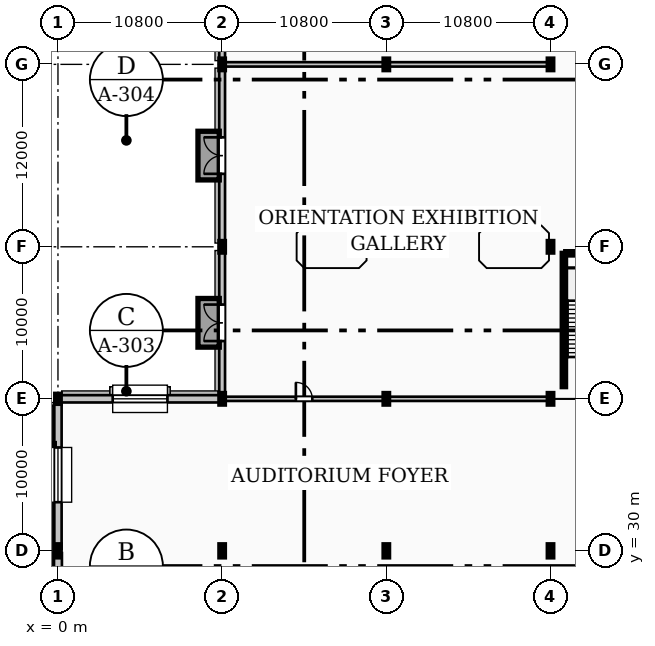
"""IFC4 building model, lengths in metres.
Left out: names, types, materials, properties, quantities, classifications, styles, units other than length and angle.
Written with IfcOpenShell. Run it as: python <this file> out.ifc"""

import sys

from ifc_helpers import new_model, si_unit, direction, frame, frame_2d, origin, origin_2d, place, context, subcontext, project, spatial, rectangle, i_section, extrude, element, fill, save


model = new_model("IFC4")
c1 = context("Model", 3, precision=1e-05, world=origin(), true_north=direction((0.0, 1.0)))
c2 = subcontext(c1, "Body", "Model", "MODEL_VIEW")
j1 = project(units=[si_unit("LENGTHUNIT", "METRE"), si_unit("PLANEANGLEUNIT", "RADIAN")], contexts=[c1])
p1 = place(None, origin())
s1 = spatial("IfcSite", under=j1, at=p1, CompositionType="ELEMENT")
p2 = place(p1, origin())
s2 = spatial("IfcBuilding", under=s1, at=p2, CompositionType="ELEMENT")
p3 = place(p2, origin())
s3 = spatial("IfcBuildingStorey", under=s2, at=p3, CompositionType="ELEMENT", Elevation=0.0)
p4 = place(p3, frame((0.0, 30.0, 0.0), z_axis=(0.0, 0.0, 1.0), x_axis=(1.0, 0.0, 0.0)))
e1 = element("IfcColumn", 1, at=p4, inside=s3, PredefinedType="COLUMN", context=c2, shape_type="SweptSolid", body=[
    extrude(i_section(OverallWidth=0.3, OverallDepth=0.8, WebThickness=0.018, FlangeThickness=0.033, FilletRadius=0.03, at=origin_2d()), origin(), (0.0, 0.0, 1.0), 4.8),
])
p5 = place(p3, frame((0.0, 40.0, 0.0), z_axis=(0.0, 0.0, 1.0), x_axis=(1.0, 0.0, 0.0)))
e2 = element("IfcColumn", 2, at=p5, inside=s3, PredefinedType="COLUMN", context=c2, shape_type="SweptSolid", body=[
    extrude(i_section(OverallWidth=0.3, OverallDepth=0.6, WebThickness=0.015, FlangeThickness=0.03, FilletRadius=0.027, at=origin_2d()), origin(), (0.0, 0.0, 1.0), 4.8),
])
p6 = place(p3, frame((10.8, 30.0, 0.0), z_axis=(0.0, 0.0, 1.0), x_axis=(1.0, 0.0, 0.0)))
e3 = element("IfcColumn", 3, at=p6, inside=s3, PredefinedType="COLUMN", context=c2, shape_type="SweptSolid", body=[
    extrude(i_section(OverallWidth=0.3, OverallDepth=0.8, WebThickness=0.018, FlangeThickness=0.033, FilletRadius=0.03, at=origin_2d()), origin(), (0.0, 0.0, 1.0), 4.8),
])
for number, where, z_axis, x_axis in (
    (4, (10.8, 40.0, 0.0), (0.0, 0.0, 1.0), (1.0, 0.0, 0.0)),
    (5, (10.8, 50.0, 0.0), (0.0, 0.0, 1.0), (1.0, 0.0, 0.0)),
    (6, (10.8, 62.0, 0.0), (0.0, 0.0, 1.0), (1.0, 0.0, 0.0)),
):
    element("IfcColumn", number, at=place(p3, frame(where, z_axis=z_axis, x_axis=x_axis)), inside=s3, PredefinedType="COLUMN", context=c2, shape_type="SweptSolid", body=[
        extrude(i_section(OverallWidth=0.3, OverallDepth=0.7, WebThickness=0.017, FlangeThickness=0.032, FilletRadius=0.027, at=origin_2d()), origin(), (0.0, 0.0, 1.0), 4.8),
    ])
p7 = place(p3, frame((21.6, 30.0, 0.0), z_axis=(0.0, 0.0, 1.0), x_axis=(1.0, 0.0, 0.0)))
e7 = element("IfcColumn", 7, at=p7, inside=s3, PredefinedType="COLUMN", context=c2, shape_type="SweptSolid", body=[
    extrude(i_section(OverallWidth=0.3, OverallDepth=0.8, WebThickness=0.018, FlangeThickness=0.033, FilletRadius=0.03, at=origin_2d()), origin(), (0.0, 0.0, 1.0), 4.8),
])
for number, where, z_axis, x_axis in (
    (8, (21.6, 40.0, 0.0), (0.0, 0.0, 1.0), (1.0, 0.0, 0.0)),
    (9, (21.6, 50.0, 0.0), (0.0, 0.0, 1.0), (1.0, 0.0, 0.0)),
    (10, (21.6, 62.0, 0.0), (0.0, 0.0, 1.0), (1.0, 0.0, 0.0)),
):
    element("IfcColumn", number, at=place(p3, frame(where, z_axis=z_axis, x_axis=x_axis)), inside=s3, PredefinedType="COLUMN", context=c2, shape_type="SweptSolid", body=[
        extrude(i_section(OverallWidth=0.3, OverallDepth=0.7, WebThickness=0.017, FlangeThickness=0.032, FilletRadius=0.027, at=origin_2d()), origin(), (0.0, 0.0, 1.0), 4.8),
    ])
p8 = place(p3, frame((32.4, 30.0, 0.0), z_axis=(0.0, 0.0, 1.0), x_axis=(1.0, 0.0, 0.0)))
e11 = element("IfcColumn", 11, at=p8, inside=s3, PredefinedType="COLUMN", context=c2, shape_type="SweptSolid", body=[
    extrude(i_section(OverallWidth=0.3, OverallDepth=0.8, WebThickness=0.018, FlangeThickness=0.033, FilletRadius=0.03, at=origin_2d()), origin(), (0.0, 0.0, 1.0), 4.8),
])
for number, where, z_axis, x_axis in (
    (12, (32.4, 40.0, 0.0), (0.0, 0.0, 1.0), (1.0, 0.0, 0.0)),
    (13, (32.4, 50.0, 0.0), (0.0, 0.0, 1.0), (1.0, 0.0, 0.0)),
    (14, (32.4, 62.0, 0.0), (0.0, 0.0, 1.0), (1.0, 0.0, 0.0)),
):
    element("IfcColumn", number, at=place(p3, frame(where, z_axis=z_axis, x_axis=x_axis)), inside=s3, PredefinedType="COLUMN", context=c2, shape_type="SweptSolid", body=[
        extrude(i_section(OverallWidth=0.3, OverallDepth=0.7, WebThickness=0.017, FlangeThickness=0.032, FilletRadius=0.027, at=origin_2d()), origin(), (0.0, 0.0, 1.0), 4.8),
    ])
p9 = place(p3, frame((-0.43, 0.45, -1.38), z_axis=(0.0, 0.0, 1.0), x_axis=(0.0, 1.0, 0.0)))
e15 = element("IfcWall", 15, at=p9, inside=s3, PredefinedType="PARAPET", context=c2, shape_type="SweptSolid", body=[
    extrude(rectangle(XDim=39.1, YDim=0.26, at=frame_2d((19.55, 0.0))), origin(), (0.0, 0.0, 1.0), 1.36),
])
p10 = place(p3, frame((0.0, 39.855, 0.0), z_axis=(0.0, 0.0, 1.0), x_axis=(0.0, -1.0, 0.0)))
e16 = element("IfcWall", 16, at=p10, inside=s3, PredefinedType="STANDARD", context=c2, shape_type="SweptSolid", body=[
    extrude(rectangle(XDim=9.71, YDim=0.48, at=frame_2d((4.855, 0.0))), origin(), (0.0, 0.0, 1.0), 4.56),
])
p11 = place(p10, frame((3.055, 0.0, 0.9)))
e17 = element("IfcOpeningElement", 17, at=p11, cuts=e16, PredefinedType="OPENING", context=c2, shape_type="SweptSolid", body=[
    extrude(rectangle(XDim=3.6, YDim=2.8, at=frame_2d((1.8, 1.4))), frame((0.0, 0.25, 0.0), z_axis=(0.0, -1.0, 0.0), x_axis=(1.0, 0.0, 0.0)), (0.0, 0.0, 1.0), 0.5),
])
p12 = place(p3, frame((0.0, 29.855, 0.0), z_axis=(0.0, 0.0, 1.0), x_axis=(0.0, -1.0, 0.0)))
e18 = element("IfcWall", 18, at=p12, inside=s3, PredefinedType="SOLIDWALL", context=c2, shape_type="SweptSolid", body=[
    extrude(rectangle(XDim=9.71, YDim=0.52, at=frame_2d((4.855, 0.0))), origin(), (0.0, 0.0, 1.0), 4.56),
])
p13 = place(p3, frame((10.8, 71.855, 0.0), z_axis=(0.0, 0.0, 1.0), x_axis=(0.0, -1.0, 0.0)))
e19 = element("IfcWall", 19, at=p13, inside=s3, PredefinedType="STANDARD", context=c2, shape_type="SweptSolid", body=[
    extrude(rectangle(XDim=9.71, YDim=0.38, at=frame_2d((4.855, 0.0))), origin(), (0.0, 0.0, 1.0), 4.04),
])
p14 = place(p13, frame((3.655, 0.0, 0.0)))
e20 = element("IfcOpeningElement", 20, at=p14, cuts=e19, PredefinedType="OPENING", context=c2, shape_type="SweptSolid", body=[
    extrude(rectangle(XDim=2.4, YDim=2.6, at=frame_2d((1.2, 1.3))), frame((0.0, 0.2, 0.0), z_axis=(0.0, -1.0, 0.0), x_axis=(1.0, 0.0, 0.0)), (0.0, 0.0, 1.0), 0.4),
])
p15 = place(p3, frame((10.8, 61.855, 0.0), z_axis=(0.0, 0.0, 1.0), x_axis=(0.0, -1.0, 0.0)))
e21 = element("IfcWall", 21, at=p15, inside=s3, PredefinedType="STANDARD", context=c2, shape_type="SweptSolid", body=[
    extrude(rectangle(XDim=11.71, YDim=0.38, at=frame_2d((5.855, 0.0))), origin(), (0.0, 0.0, 1.0), 3.939),
])
p16 = place(p15, frame((4.655, 0.0, 0.0)))
e22 = element("IfcOpeningElement", 22, at=p16, cuts=e21, PredefinedType="OPENING", context=c2, shape_type="SweptSolid", body=[
    extrude(rectangle(XDim=2.4, YDim=2.6, at=frame_2d((1.2, 1.3))), frame((0.0, 0.2, 0.0), z_axis=(0.0, -1.0, 0.0), x_axis=(1.0, 0.0, 0.0)), (0.0, 0.0, 1.0), 0.4),
])
p17 = place(p3, frame((10.8, 49.855, 0.0), z_axis=(0.0, 0.0, 1.0), x_axis=(0.0, -1.0, 0.0)))
e23 = element("IfcWall", 23, at=p17, inside=s3, PredefinedType="STANDARD", context=c2, shape_type="SweptSolid", body=[
    extrude(rectangle(XDim=9.71, YDim=0.38, at=frame_2d((4.855, 0.0))), origin(), (0.0, 0.0, 1.0), 4.04),
])
p18 = place(p17, frame((3.655, 0.0, 0.0)))
e24 = element("IfcOpeningElement", 24, at=p18, cuts=e23, PredefinedType="OPENING", context=c2, shape_type="SweptSolid", body=[
    extrude(rectangle(XDim=2.4, YDim=2.6, at=frame_2d((1.2, 1.3))), frame((0.0, 0.2, 0.0), z_axis=(0.0, -1.0, 0.0), x_axis=(1.0, 0.0, 0.0)), (0.0, 0.0, 1.0), 0.4),
])
p19 = place(p3, frame((10.655, 40.0, 0.0), z_axis=(0.0, 0.0, 1.0), x_axis=(-1.0, 0.0, 0.0)))
e25 = element("IfcWall", 25, at=p19, inside=s3, PredefinedType="STANDARD", context=c2, shape_type="SweptSolid", body=[
    extrude(rectangle(XDim=10.51, YDim=0.48, at=frame_2d((5.255, 0.0))), origin(), (0.0, 0.0, 1.0), 4.009),
])
p20 = place(p19, frame((3.455, 0.0, 0.9)))
e26 = element("IfcOpeningElement", 26, at=p20, cuts=e25, PredefinedType="OPENING", context=c2, shape_type="SweptSolid", body=[
    extrude(rectangle(XDim=3.6, YDim=2.8, at=frame_2d((1.8, 1.4))), frame((0.0, 0.25, 0.0), z_axis=(0.0, -1.0, 0.0), x_axis=(1.0, 0.0, 0.0)), (0.0, 0.0, 1.0), 0.5),
])
p21 = place(p3, frame((33.28, 40.8, 0.0), z_axis=(0.0, 0.0, 1.0), x_axis=(0.0, 1.0, 0.0)))
e27 = element("IfcWall", 27, at=p21, inside=s3, PredefinedType="SHEAR", context=c2, shape_type="SweptSolid", body=[
    extrude(rectangle(XDim=8.77, YDim=0.22, at=frame_2d((4.385, 0.0))), origin(), (0.0, 0.0, 1.0), 4.56),
])
p22 = place(p3, frame((33.4, 49.57, 0.0), z_axis=(0.0, 0.0, 1.0), x_axis=(1.0, 0.0, 0.0)))
e28 = element("IfcWall", 28, at=p22, inside=s3, PredefinedType="SHEAR", context=c2, shape_type="SweptSolid", body=[
    extrude(rectangle(XDim=4.4, YDim=0.22, at=frame_2d((2.2, 0.0))), origin(), (0.0, 0.0, 1.0), 4.56),
])
p23 = place(p3, frame((10.98, 40.0, 0.0), z_axis=(0.0, 0.0, 1.0), x_axis=(1.0, 0.0, 0.0)))
e29 = element("IfcWall", 29, at=p23, inside=s3, PredefinedType="SOLIDWALL", context=c2, shape_type="SweptSolid", body=[
    extrude(rectangle(XDim=10.42, YDim=0.28, at=frame_2d((5.21, 0.0))), origin(), (0.0, 0.0, 1.0), 3.989),
])
p24 = place(p23, frame((4.67, 0.0, 0.0)))
e30 = element("IfcOpeningElement", 30, at=p24, cuts=e29, PredefinedType="OPENING", context=c2, shape_type="SweptSolid", body=[
    extrude(rectangle(XDim=1.08, YDim=2.25, at=frame_2d((0.54, 1.125))), frame((0.0, 0.15, 0.0), z_axis=(0.0, -1.0, 0.0), x_axis=(1.0, 0.0, 0.0)), (0.0, 0.0, 1.0), 0.3),
])
p25 = place(p3, frame((21.8, 40.0, 0.0), z_axis=(0.0, 0.0, 1.0), x_axis=(1.0, 0.0, 0.0)))
e31 = element("IfcWall", 31, at=p25, inside=s3, PredefinedType="SOLIDWALL", context=c2, shape_type="SweptSolid", body=[
    extrude(rectangle(XDim=10.4, YDim=0.28, at=frame_2d((5.2, 0.0))), origin(), (0.0, 0.0, 1.0), 3.989),
])
p26 = place(p3, frame((10.98, 62.0, 0.0), z_axis=(0.0, 0.0, 1.0), x_axis=(1.0, 0.0, 0.0)))
e32 = element("IfcWall", 32, at=p26, inside=s3, PredefinedType="PARTITIONING", context=c2, shape_type="SweptSolid", body=[
    extrude(rectangle(XDim=10.42, YDim=0.29, at=frame_2d((5.21, 0.0))), origin(), (0.0, 0.0, 1.0), 4.049),
])
p27 = place(p3, frame((21.8, 62.0, 0.0), z_axis=(0.0, 0.0, 1.0), x_axis=(1.0, 0.0, 0.0)))
e33 = element("IfcWall", 33, at=p27, inside=s3, PredefinedType="PARTITIONING", context=c2, shape_type="SweptSolid", body=[
    extrude(rectangle(XDim=10.4, YDim=0.29, at=frame_2d((5.2, 0.0))), origin(), (0.0, 0.0, 1.0), 4.049),
])
p28 = place(p11, origin())
e34 = element("IfcWindow", 34, at=p28, inside=s3, PartitioningType="SINGLE_PANEL", PredefinedType="WINDOW", context=c2, shape_type="SweptSolid", body=[
    extrude(rectangle(XDim=3.6, YDim=2.8, at=frame_2d((1.8, 1.4))), frame((0.0, 0.03, 0.0), z_axis=(0.0, -1.0, 0.0), x_axis=(1.0, 0.0, 0.0)), (0.0, 0.0, 1.0), 0.06),
])
fill(e17, e34)
p29 = place(p16, frame((2.4, 0.0, 0.0), z_axis=(0.0, 0.0, 1.0), x_axis=(-1.0, 0.0, 0.0)))
e35 = element("IfcDoor", 35, at=p29, inside=s3, OperationType="DOUBLE_DOOR_SINGLE_SWING", PredefinedType="DOOR", context=c2, shape_type="SweptSolid", body=[
    extrude(rectangle(XDim=2.4, YDim=2.6, at=frame_2d((1.2, 1.3))), frame((0.0, 0.025, 0.0), z_axis=(0.0, -1.0, 0.0), x_axis=(1.0, 0.0, 0.0)), (0.0, 0.0, 1.0), 0.05),
])
fill(e22, e35)
p30 = place(p18, frame((2.4, 0.0, 0.0), z_axis=(0.0, 0.0, 1.0), x_axis=(-1.0, 0.0, 0.0)))
e36 = element("IfcDoor", 36, at=p30, inside=s3, OperationType="DOUBLE_DOOR_SINGLE_SWING", PredefinedType="DOOR", context=c2, shape_type="SweptSolid", body=[
    extrude(rectangle(XDim=2.4, YDim=2.6, at=frame_2d((1.2, 1.3))), frame((0.0, 0.025, 0.0), z_axis=(0.0, -1.0, 0.0), x_axis=(1.0, 0.0, 0.0)), (0.0, 0.0, 1.0), 0.05),
])
fill(e24, e36)
p31 = place(p20, origin())
e37 = element("IfcWindow", 37, at=p31, inside=s3, PartitioningType="SINGLE_PANEL", PredefinedType="WINDOW", context=c2, shape_type="SweptSolid", body=[
    extrude(rectangle(XDim=3.6, YDim=2.8, at=frame_2d((1.8, 1.4))), frame((0.0, 0.03, 0.0), z_axis=(0.0, -1.0, 0.0), x_axis=(1.0, 0.0, 0.0)), (0.0, 0.0, 1.0), 0.06),
])
fill(e26, e37)
p32 = place(p24, origin())
e38 = element("IfcDoor", 38, at=p32, inside=s3, OperationType="SINGLE_SWING_LEFT", PredefinedType="DOOR", context=c2, shape_type="SweptSolid", body=[
    extrude(rectangle(XDim=1.08, YDim=2.25, at=frame_2d((0.54, 1.125))), frame((0.0, 0.025, 0.0), z_axis=(0.0, -1.0, 0.0), x_axis=(1.0, 0.0, 0.0)), (0.0, 0.0, 1.0), 0.05),
])
fill(e30, e38)
save(model, sys.argv[1])
